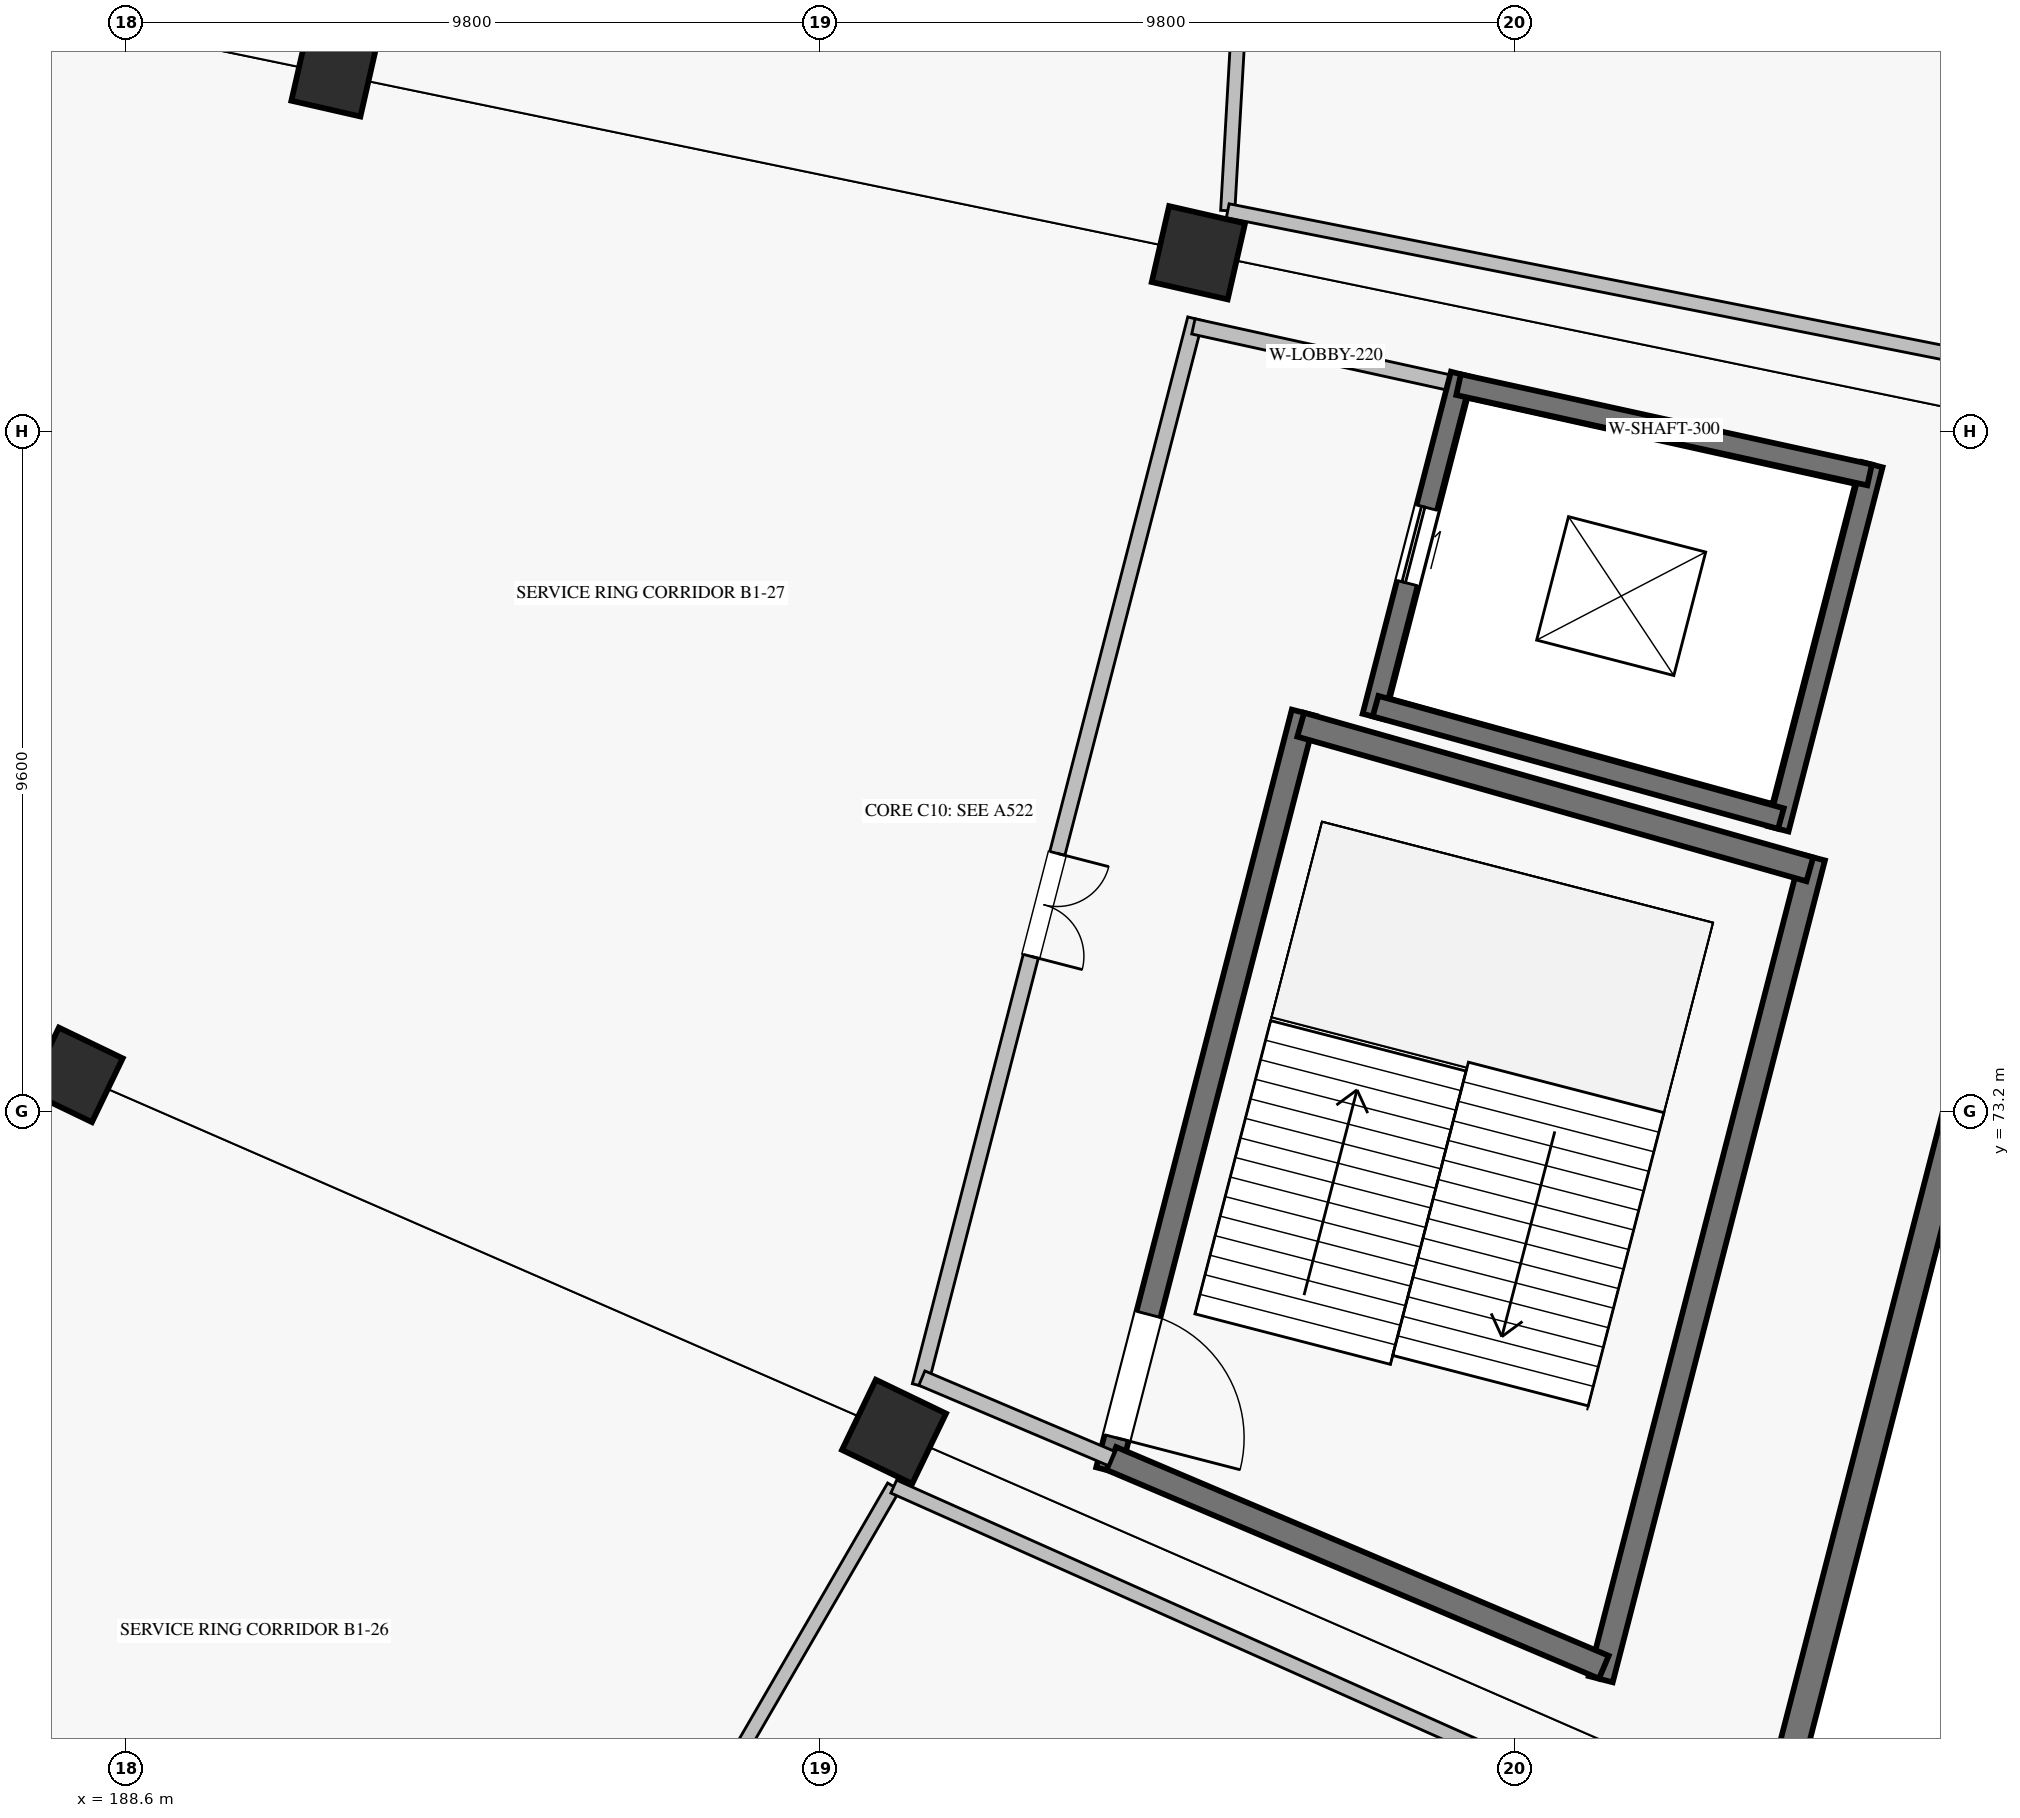
"""IFC4 building model, lengths in metres.
Left out: names, types, materials, properties, quantities, classifications, styles, units other than length and angle.
Written with IfcOpenShell. Run it as: python <this file> out.ifc"""

import sys

from ifc_helpers import new_model, si_unit, direction, frame, frame_2d, origin, origin_2d, place, context, subcontext, project, spatial, rectangle, extrude, element, fill, save


model = new_model("IFC4")
c1 = context("Model", 3, precision=1e-05, world=origin(), true_north=direction((0.0, 1.0)))
c2 = subcontext(c1, "Body", "Model", "MODEL_VIEW")
j1 = project(units=[si_unit("LENGTHUNIT", "METRE"), si_unit("PLANEANGLEUNIT", "RADIAN")], contexts=[c1])
p1 = place(None, origin())
s1 = spatial("IfcSite", under=j1, at=p1, CompositionType="ELEMENT")
p2 = place(p1, origin())
s2 = spatial("IfcBuilding", under=s1, at=p2, CompositionType="ELEMENT")
p3 = place(p2, frame((0.0, 0.0, -5.44)))
s3 = spatial("IfcBuildingStorey", under=s2, at=p3, CompositionType="ELEMENT", Elevation=-5.44)
for number, where, z_axis, x_axis in (
    (1, (187.886, 73.713, 0.0), (0.0, 0.0, 1.0), (0.901, -0.434, 0.0)),
    (2, (191.533, 87.84, 0.0), (0.0, 0.0, 1.0), (0.975, -0.223, 0.0)),
):
    element("IfcColumn", number, at=place(p3, frame(where, z_axis=z_axis, x_axis=x_axis)), inside=s3, PredefinedType="COLUMN", context=c2, shape_type="SweptSolid", body=[
        extrude(rectangle(XDim=1.0, YDim=1.0, at=origin_2d()), origin(), (0.0, 0.0, 1.0), 5.44),
    ])
for number, where, z_axis, x_axis in (
    (3, (199.441, 68.675, 0.0), (0.0, 0.0, 1.0), (0.901, -0.434, 0.0)),
    (4, (203.738, 85.318, 0.0), (0.0, 0.0, 1.0), (0.975, -0.223, 0.0)),
):
    element("IfcColumn", number, at=place(p3, frame(where, z_axis=z_axis, x_axis=x_axis)), inside=s3, PredefinedType="COLUMN", context=c2, shape_type="SweptSolid", body=[
        extrude(rectangle(XDim=1.1, YDim=1.1, at=origin_2d()), origin(), (0.0, 0.0, 1.0), 5.44),
    ])
p4 = place(p3, frame((211.982, 63.628, 0.0), z_axis=(0.0, 0.0, 1.0), x_axis=(0.249961059007, 0.968255890238, 0.0)))
e5 = element("IfcWall", 5, at=p4, inside=s3, PredefinedType="SOLIDWALL", context=c2, shape_type="SweptSolid", body=[
    extrude(rectangle(XDim=19.206, YDim=0.4, at=frame_2d((9.603, 0.0))), origin(), (0.0, 0.0, 1.0), 4.42),
])
p5 = place(p3, frame((202.464, 68.129, 0.0), z_axis=(0.0, 0.0, 1.0), x_axis=(0.249959564539, 0.968256276042, 0.0)))
e6 = element("IfcWall", 6, at=p5, inside=s3, PredefinedType="SHEAR", context=c2, shape_type="SweptSolid", body=[
    extrude(rectangle(XDim=11.047, YDim=0.35, at=frame_2d((5.523, 0.0))), origin(), (0.0, 0.0, 1.0), 5.14),
])
p6 = place(p5, frame((0.475, 0.0, 0.0)))
e7 = element("IfcOpeningElement", 7, at=p6, cuts=e6, PredefinedType="OPENING", context=c2, shape_type="SweptSolid", body=[
    extrude(rectangle(XDim=1.8, YDim=2.2, at=frame_2d((0.9, 1.1))), frame((0.0, 0.185, 0.0), z_axis=(0.0, -1.0, 0.0), x_axis=(1.0, 0.0, 0.0)), (0.0, 0.0, 1.0), 0.37),
])
p7 = place(p3, frame((209.417, 65.182, 0.0), z_axis=(0.0, 0.0, 1.0), x_axis=(0.249969221583, 0.968253782983, 0.0)))
e8 = element("IfcWall", 8, at=p7, inside=s3, PredefinedType="SHEAR", context=c2, shape_type="SweptSolid", body=[
    extrude(rectangle(XDim=11.982, YDim=0.35, at=frame_2d((5.991, 0.0))), origin(), (0.0, 0.0, 1.0), 5.14),
])
p8 = place(p3, frame((202.508, 68.299, 0.0), z_axis=(0.0, 0.0, 1.0), x_axis=(0.920704667209, -0.390260061728, 0.0)))
e9 = element("IfcWall", 9, at=p8, inside=s3, PredefinedType="SHEAR", context=c2, shape_type="SweptSolid", body=[
    extrude(rectangle(XDim=7.552, YDim=0.35, at=frame_2d((3.776, 0.0))), origin(), (0.0, 0.0, 1.0), 5.14),
])
p9 = place(p3, frame((205.182, 78.656, 0.0), z_axis=(0.0, 0.0, 1.0), x_axis=(0.961945802461, -0.273240321195, 0.0)))
e10 = element("IfcWall", 10, at=p9, inside=s3, PredefinedType="SHEAR", context=c2, shape_type="SweptSolid", body=[
    extrude(rectangle(XDim=7.47, YDim=0.35, at=frame_2d((3.735, 0.0))), origin(), (0.0, 0.0, 1.0), 5.14),
])
p10 = place(p3, frame((206.201, 78.772, 0.0), z_axis=(0.0, 0.0, 1.0), x_axis=(0.249946120621, 0.968259746549, 0.0)))
e11 = element("IfcWall", 11, at=p10, inside=s3, PredefinedType="SHEAR", context=c2, shape_type="SweptSolid", body=[
    extrude(rectangle(XDim=4.987, YDim=0.3, at=frame_2d((2.494, 0.0))), origin(), (0.0, 0.0, 1.0), 5.14),
])
p11 = place(p10, frame((1.944, 0.0, 0.0)))
e12 = element("IfcOpeningElement", 12, at=p11, cuts=e11, PredefinedType="OPENING", context=c2, shape_type="SweptSolid", body=[
    extrude(rectangle(XDim=1.1, YDim=2.2, at=frame_2d((0.55, 1.1))), frame((0.0, 0.16, 0.0), z_axis=(0.0, -1.0, 0.0), x_axis=(1.0, 0.0, 0.0)), (0.0, 0.0, 1.0), 0.32),
])
p12 = place(p3, frame((211.923, 77.186, 0.0), z_axis=(0.0, 0.0, 1.0), x_axis=(0.249918349381, 0.968266914979, 0.0)))
e13 = element("IfcWall", 13, at=p12, inside=s3, PredefinedType="SHEAR", context=c2, shape_type="SweptSolid", body=[
    extrude(rectangle(XDim=5.309, YDim=0.3, at=frame_2d((2.655, 0.0))), origin(), (0.0, 0.0, 1.0), 5.14),
])
p13 = place(p3, frame((206.239, 78.917, 0.0), z_axis=(0.0, 0.0, 1.0), x_axis=(0.963642107639, -0.267196348002, 0.0)))
e14 = element("IfcWall", 14, at=p13, inside=s3, PredefinedType="SHEAR", context=c2, shape_type="SweptSolid", body=[
    extrude(rectangle(XDim=5.937, YDim=0.3, at=frame_2d((2.969, 0.0))), origin(), (0.0, 0.0, 1.0), 5.14),
])
p14 = place(p3, frame((207.41, 83.456, 0.0), z_axis=(0.0, 0.0, 1.0), x_axis=(0.976707381947, -0.214575604509, 0.0)))
e15 = element("IfcWall", 15, at=p14, inside=s3, PredefinedType="SHEAR", context=c2, shape_type="SweptSolid", body=[
    extrude(rectangle(XDim=5.94, YDim=0.3, at=frame_2d((2.97, 0.0))), origin(), (0.0, 0.0, 1.0), 5.14),
])
p15 = place(p3, frame((199.807, 69.325, 0.0), z_axis=(0.0, 0.0, 1.0), x_axis=(0.249963472505, 0.968255267176, 0.0)))
e16 = element("IfcWall", 16, at=p15, inside=s3, PredefinedType="SOLIDWALL", context=c2, shape_type="SweptSolid", body=[
    extrude(rectangle(XDim=15.553, YDim=0.22, at=frame_2d((7.776, 0.0))), origin(), (0.0, 0.0, 1.0), 4.088),
])
p16 = place(p15, frame((6.26, 0.0, 0.0)))
e17 = element("IfcOpeningElement", 17, at=p16, cuts=e16, PredefinedType="OPENING", context=c2, shape_type="SweptSolid", body=[
    extrude(rectangle(XDim=1.5, YDim=2.2, at=frame_2d((0.75, 1.1))), frame((0.0, 0.12, 0.0), z_axis=(0.0, -1.0, 0.0), x_axis=(1.0, 0.0, 0.0)), (0.0, 0.0, 1.0), 0.24),
])
p17 = place(p3, frame((199.834, 69.432, 0.0), z_axis=(0.0, 0.0, 1.0), x_axis=(0.920711790761, -0.390243255361, 0.0)))
e18 = element("IfcWall", 18, at=p17, inside=s3, PredefinedType="SOLIDWALL", context=c2, shape_type="SweptSolid", body=[
    extrude(rectangle(XDim=2.904, YDim=0.22, at=frame_2d((1.452, 0.0))), origin(), (0.0, 0.0, 1.0), 5.14),
])
p18 = place(p3, frame((203.667, 84.278, 0.0), z_axis=(0.0, 0.0, 1.0), x_axis=(0.976714725209, -0.214542176645, 0.0)))
e19 = element("IfcWall", 19, at=p18, inside=s3, PredefinedType="SOLIDWALL", context=c2, shape_type="SweptSolid", body=[
    extrude(rectangle(XDim=3.833, YDim=0.22, at=frame_2d((1.917, 0.0))), origin(), (0.0, 0.0, 1.0), 5.14),
])
p19 = place(p3, frame((191.179, 53.658, 0.0), z_axis=(0.0, 0.0, 1.0), x_axis=(0.501617777052, 0.865089362867, 0.0)))
e20 = element("IfcWall", 20, at=p19, inside=s3, PredefinedType="PARTITIONING", context=c2, shape_type="SweptSolid", body=[
    extrude(rectangle(XDim=16.464, YDim=0.2, at=frame_2d((8.232, 0.0))), origin(), (0.0, 0.0, 1.0), 4.46),
])
p20 = place(p19, frame((7.742, 0.0, 0.0)))
e21 = element("IfcOpeningElement", 21, at=p20, cuts=e20, PredefinedType="OPENING", context=c2, shape_type="SweptSolid", body=[
    extrude(rectangle(XDim=0.98, YDim=2.15, at=frame_2d((0.49, 1.075))), frame((0.0, 0.11, 0.0), z_axis=(0.0, -1.0, 0.0), x_axis=(1.0, 0.0, 0.0)), (0.0, 0.0, 1.0), 0.22),
])
p21 = place(p3, frame((199.438, 67.901, 0.0), z_axis=(0.0, 0.0, 1.0), x_axis=(0.913245562849, -0.407409550621, 0.0)))
e22 = element("IfcWall", 22, at=p21, inside=s3, PredefinedType="PARTITIONING", context=c2, shape_type="SweptSolid", body=[
    extrude(rectangle(XDim=12.4, YDim=0.2, at=frame_2d((6.2, 0.0))), origin(), (0.0, 0.0, 1.0), 4.46),
])
p22 = place(p3, frame((204.152, 85.911, 0.0), z_axis=(0.0, 0.0, 1.0), x_axis=(0.057603503798, 0.998339539611, 0.0)))
e23 = element("IfcWall", 23, at=p22, inside=s3, PredefinedType="PARTITIONING", context=c2, shape_type="SweptSolid", body=[
    extrude(rectangle(XDim=15.444, YDim=0.2, at=frame_2d((7.722, 0.0))), origin(), (0.0, 0.0, 1.0), 4.46),
])
p23 = place(p22, frame((6.882, 0.0, 0.0)))
e24 = element("IfcOpeningElement", 24, at=p23, cuts=e23, PredefinedType="OPENING", context=c2, shape_type="SweptSolid", body=[
    extrude(rectangle(XDim=1.68, YDim=2.3, at=frame_2d((0.84, 1.15))), frame((0.0, 0.11, 0.0), z_axis=(0.0, -1.0, 0.0), x_axis=(1.0, 0.0, 0.0)), (0.0, 0.0, 1.0), 0.22),
])
p24 = place(p3, frame((204.152, 85.911, 0.0), z_axis=(0.0, 0.0, 1.0), x_axis=(0.980904167784, -0.194491680088, 0.0)))
e25 = element("IfcWall", 25, at=p24, inside=s3, PredefinedType="PARTITIONING", context=c2, shape_type="SweptSolid", body=[
    extrude(rectangle(XDim=12.257, YDim=0.2, at=frame_2d((6.128, 0.0))), origin(), (0.0, 0.0, 1.0), 4.46),
])
p25 = place(p6, frame((1.8, 0.0, 0.0), z_axis=(0.0, 0.0, 1.0), x_axis=(-1.0, 0.0, 0.0)))
e26 = element("IfcDoor", 26, at=p25, inside=s3, OperationType="SINGLE_SWING_RIGHT", PredefinedType="DOOR", context=c2, shape_type="SweptSolid", body=[
    extrude(rectangle(XDim=1.8, YDim=2.2, at=frame_2d((0.9, 1.1))), frame((0.0, 0.025, 0.0), z_axis=(0.0, -1.0, 0.0), x_axis=(1.0, 0.0, 0.0)), (0.0, 0.0, 1.0), 0.05),
])
fill(e7, e26)
p26 = place(p11, origin())
e27 = element("IfcDoor", 27, at=p26, inside=s3, OperationType="SLIDING_TO_RIGHT", PredefinedType="DOOR", context=c2, shape_type="SweptSolid", body=[
    extrude(rectangle(XDim=1.1, YDim=2.2, at=frame_2d((0.55, 1.1))), frame((0.0, 0.025, 0.0), z_axis=(0.0, -1.0, 0.0), x_axis=(1.0, 0.0, 0.0)), (0.0, 0.0, 1.0), 0.05),
])
fill(e12, e27)
p27 = place(p16, frame((1.5, 0.0, 0.0), z_axis=(0.0, 0.0, 1.0), x_axis=(-1.0, 0.0, 0.0)))
e28 = element("IfcDoor", 28, at=p27, inside=s3, OperationType="DOUBLE_DOOR_SINGLE_SWING", PredefinedType="DOOR", context=c2, shape_type="SweptSolid", body=[
    extrude(rectangle(XDim=1.5, YDim=2.2, at=frame_2d((0.75, 1.1))), frame((0.0, 0.025, 0.0), z_axis=(0.0, -1.0, 0.0), x_axis=(1.0, 0.0, 0.0)), (0.0, 0.0, 1.0), 0.05),
])
fill(e17, e28)
save(model, sys.argv[1])
